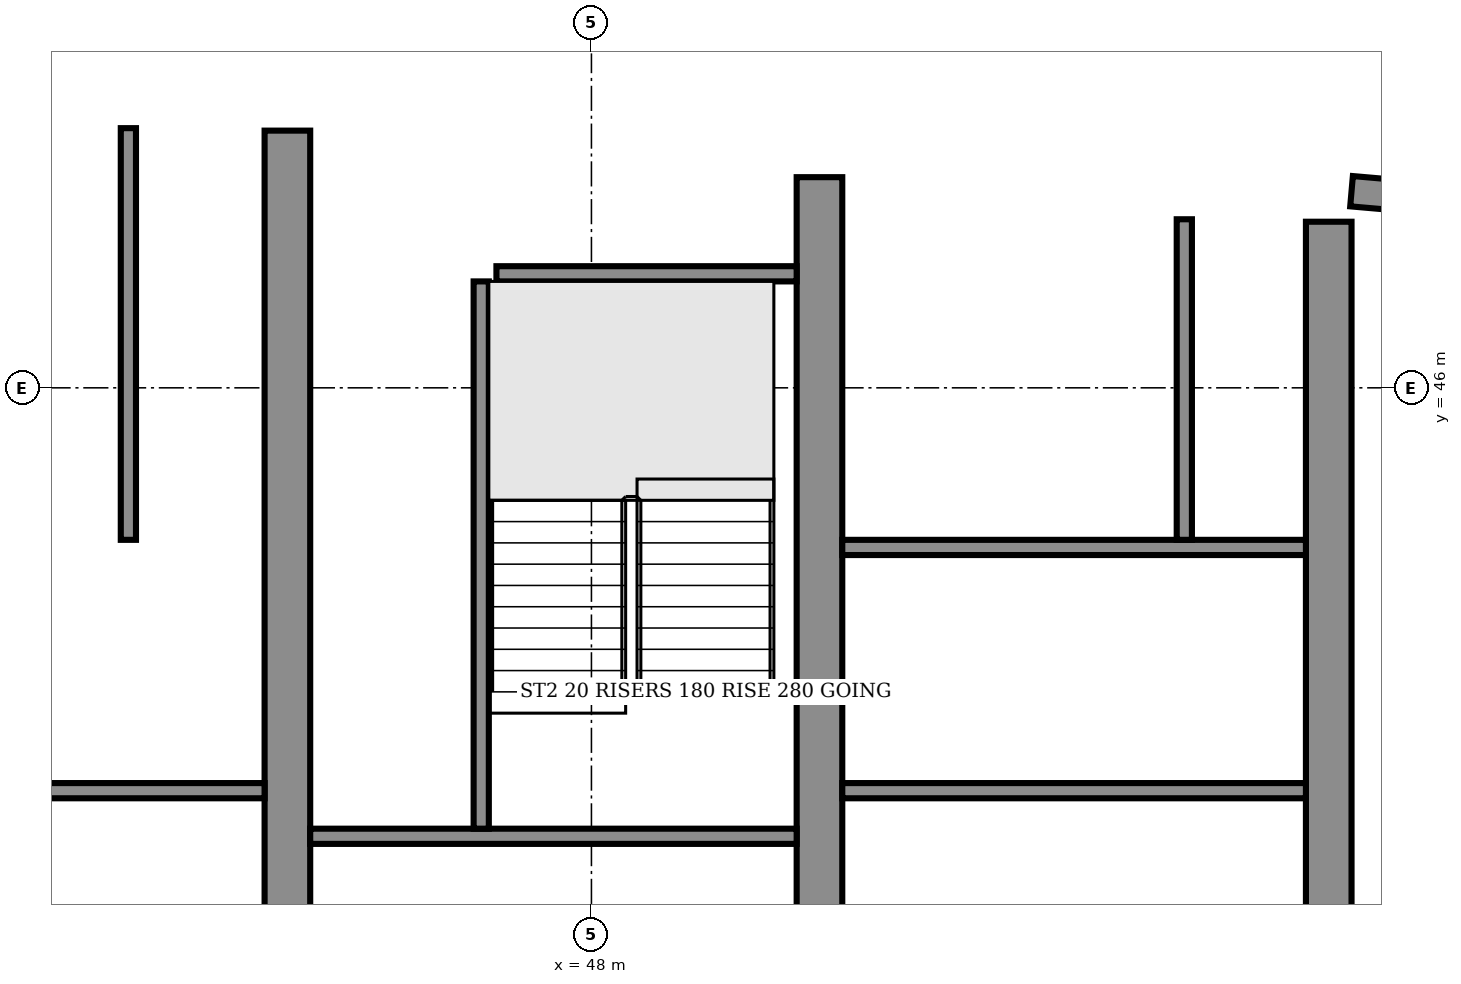
"""IFC4 building model, lengths in metres.
Left out: names, types, materials, properties, quantities, classifications, styles, units other than length and angle.
Written with IfcOpenShell. Run it as: python <this file> out.ifc"""

import sys

from ifc_helpers import new_model, si_unit, direction, frame, frame_2d, origin, origin_2d, place, context, subcontext, project, spatial, polyline, rectangle, i_section, outline, extrude, element, fill, save


model = new_model("IFC4")
c1 = context("Model", 3, precision=1e-05, world=origin(), true_north=direction((0.0, 1.0)))
c2 = subcontext(c1, "Body", "Model", "MODEL_VIEW")
j1 = project(units=[si_unit("LENGTHUNIT", "METRE"), si_unit("PLANEANGLEUNIT", "RADIAN")], contexts=[c1])
p1 = place(None, origin())
s1 = spatial("IfcSite", under=j1, at=p1, CompositionType="ELEMENT")
p2 = place(p1, origin())
s2 = spatial("IfcBuilding", under=s1, at=p2, CompositionType="ELEMENT")
p3 = place(p2, frame((0.0, 0.0, 207.1)))
s3 = spatial("IfcBuildingStorey", under=s2, at=p3, CompositionType="ELEMENT", Elevation=207.1)
p4 = place(p3, frame((0.0, 0.0, -0.0)))
e1 = element("IfcWall", 1, at=p4, inside=s3, PredefinedType="SHEAR", context=c2, shape_type="SweptSolid", body=[
    extrude(outline(polyline([(23.0, 48.185), (40.5, 49.716), (58.0, 48.185), (58.0, 48.787), (40.5, 50.318), (23.0, 48.787), (23.0, 48.185)])), origin(), (0.0, 0.0, 1.0), 3.6),
])
p5 = place(p3, frame((44.0, 34.6, 0.0), z_axis=(0.0, 0.0, 1.0), x_axis=(0.0, 1.0, 0.0)))
e2 = element("IfcWall", 2, at=p5, inside=s3, PredefinedType="SHEAR", context=c2, shape_type="SweptSolid", body=[
    extrude(rectangle(XDim=14.784, YDim=0.6, at=frame_2d((7.392, 0.0))), origin(), (0.0, 0.0, 1.0), 3.6),
])
p6 = place(p5, frame((11.608, 0.0, 0.0)))
e3 = element("IfcOpeningElement", 3, at=p6, cuts=e2, PredefinedType="OPENING", context=c2, shape_type="SweptSolid", body=[
    extrude(rectangle(XDim=1.0, YDim=2.1, at=frame_2d((0.5, 1.05))), frame((0.0, 0.31, 0.0), z_axis=(0.0, -1.0, 0.0), x_axis=(1.0, 0.0, 0.0)), (0.0, 0.0, 1.0), 0.62),
])
p7 = place(p5, frame((3.8, 0.0, 0.0)))
e4 = element("IfcOpeningElement", 4, at=p7, cuts=e2, PredefinedType="OPENING", context=c2, shape_type="SweptSolid", body=[
    extrude(rectangle(XDim=1.1, YDim=2.1, at=frame_2d((0.55, 1.05))), frame((0.0, 0.31, 0.0), z_axis=(0.0, -1.0, 0.0), x_axis=(1.0, 0.0, 0.0)), (0.0, 0.0, 1.0), 0.62),
])
p8 = place(p3, frame((51.0, 34.6, 0.0), z_axis=(0.0, 0.0, 1.0), x_axis=(0.0, 1.0, 0.0)))
e5 = element("IfcWall", 5, at=p8, inside=s3, PredefinedType="SHEAR", context=c2, shape_type="SweptSolid", body=[
    extrude(rectangle(XDim=14.171, YDim=0.6, at=frame_2d((7.085, 0.0))), origin(), (0.0, 0.0, 1.0), 3.6),
])
p9 = place(p8, frame((3.8, 0.0, 0.0)))
e6 = element("IfcOpeningElement", 6, at=p9, cuts=e5, PredefinedType="OPENING", context=c2, shape_type="SweptSolid", body=[
    extrude(rectangle(XDim=1.1, YDim=2.1, at=frame_2d((0.55, 1.05))), frame((0.0, 0.31, 0.0), z_axis=(0.0, -1.0, 0.0), x_axis=(1.0, 0.0, 0.0)), (0.0, 0.0, 1.0), 0.62),
])
p10 = place(p3, frame((57.7, 34.6, 0.0), z_axis=(0.0, 0.0, 1.0), x_axis=(0.0, 1.0, 0.0)))
e7 = element("IfcWall", 7, at=p10, inside=s3, PredefinedType="SHEAR", context=c2, shape_type="SweptSolid", body=[
    extrude(rectangle(XDim=13.585, YDim=0.6, at=frame_2d((6.792, 0.0))), origin(), (0.0, 0.0, 1.0), 3.6),
])
p11 = place(p3, frame((48.0, 50.022, 0.0), z_axis=(0.0, 0.0, 1.0), x_axis=(0.087156, 0.996197, 0.0)))
e8 = element("IfcColumn", 8, at=p11, inside=s3, PredefinedType="COLUMN", context=c2, shape_type="SweptSolid", body=[
    extrude(i_section(OverallWidth=0.3, OverallDepth=0.5, WebThickness=0.014, FlangeThickness=0.028, FilletRadius=0.027, at=origin_2d()), origin(), (0.0, 0.0, 1.0), 3.6),
])
p12 = place(p3, frame((60.983, 48.326, 0.0), z_axis=(0.0, 0.0, 1.0), x_axis=(-0.996194, 0.087168, 0.0)))
e9 = element("IfcWall", 9, at=p12, inside=s3, PredefinedType="SOLIDWALL", context=c2, shape_type="SweptSolid", body=[
    extrude(rectangle(XDim=2.994, YDim=0.4, at=frame_2d((1.497, 0.0))), origin(), (0.0, 0.0, 1.0), 3.2),
])
p13 = place(p3, frame((37.3, 40.7, 0.0), z_axis=(0.0, 0.0, 1.0), x_axis=(1.0, 0.0, 0.0)))
e10 = element("IfcWall", 10, at=p13, inside=s3, PredefinedType="PARTITIONING", context=c2, shape_type="SweptSolid", body=[
    extrude(rectangle(XDim=6.4, YDim=0.2, at=frame_2d((3.2, 0.0))), origin(), (0.0, 0.0, 1.0), 3.2),
])
p14 = place(p13, frame((0.417, 0.0, 0.0)))
e11 = element("IfcOpeningElement", 11, at=p14, cuts=e10, PredefinedType="OPENING", context=c2, shape_type="SweptSolid", body=[
    extrude(rectangle(XDim=1.1, YDim=2.1, at=frame_2d((0.55, 1.05))), frame((0.0, 0.11, 0.0), z_axis=(0.0, -1.0, 0.0), x_axis=(1.0, 0.0, 0.0)), (0.0, 0.0, 1.0), 0.22),
])
p15 = place(p13, frame((2.65, 0.0, 0.0)))
e12 = element("IfcOpeningElement", 12, at=p15, cuts=e10, PredefinedType="OPENING", context=c2, shape_type="SweptSolid", body=[
    extrude(rectangle(XDim=1.1, YDim=2.1, at=frame_2d((0.55, 1.05))), frame((0.0, 0.11, 0.0), z_axis=(0.0, -1.0, 0.0), x_axis=(1.0, 0.0, 0.0)), (0.0, 0.0, 1.0), 0.22),
])
p16 = place(p13, frame((4.883, 0.0, 0.0)))
e13 = element("IfcOpeningElement", 13, at=p16, cuts=e10, PredefinedType="OPENING", context=c2, shape_type="SweptSolid", body=[
    extrude(rectangle(XDim=1.1, YDim=2.1, at=frame_2d((0.55, 1.05))), frame((0.0, 0.11, 0.0), z_axis=(0.0, -1.0, 0.0), x_axis=(1.0, 0.0, 0.0)), (0.0, 0.0, 1.0), 0.22),
])
p17 = place(p3, frame((0.0, 0.0, -0.0)))
e14 = element("IfcWall", 14, at=p17, inside=s3, PredefinedType="PARTITIONING", context=c2, shape_type="SweptSolid", body=[
    extrude(outline(polyline([(39.433, 40.8), (39.233, 40.8), (39.233, 43.8), (37.3, 43.8), (37.3, 44.0), (43.7, 44.0), (43.7, 43.8), (41.767, 43.8), (41.767, 40.8), (41.567, 40.8), (41.567, 43.8), (39.433, 43.8), (39.433, 40.8)])), origin(), (0.0, 0.0, 1.0), 3.2),
])
p18 = place(p3, frame((41.908, 44.0, 0.0), z_axis=(0.0, 0.0, 1.0), x_axis=(0.0, 1.0, 0.0)))
e15 = element("IfcWall", 15, at=p18, inside=s3, PredefinedType="PARTITIONING", context=c2, shape_type="SweptSolid", body=[
    extrude(rectangle(XDim=5.416, YDim=0.2, at=frame_2d((2.708, 0.0))), origin(), (0.0, 0.0, 1.0), 3.2),
])
p19 = place(p18, frame((2.208, 0.0, 0.0)))
e16 = element("IfcOpeningElement", 16, at=p19, cuts=e15, PredefinedType="OPENING", context=c2, shape_type="SweptSolid", body=[
    extrude(rectangle(XDim=1.0, YDim=2.1, at=frame_2d((0.5, 1.05))), frame((0.0, 0.11, 0.0), z_axis=(0.0, -1.0, 0.0), x_axis=(1.0, 0.0, 0.0)), (0.0, 0.0, 1.0), 0.22),
])
p20 = place(p3, frame((44.3, 40.1, 0.0), z_axis=(0.0, 0.0, 1.0), x_axis=(1.0, 0.0, 0.0)))
e17 = element("IfcWall", 17, at=p20, inside=s3, PredefinedType="SHEAR", context=c2, shape_type="SweptSolid", body=[
    extrude(rectangle(XDim=6.4, YDim=0.2, at=frame_2d((3.2, 0.0))), origin(), (0.0, 0.0, 1.0), 3.2),
])
p21 = place(p20, frame((3.625, 0.0, 0.0)))
e18 = element("IfcOpeningElement", 18, at=p21, cuts=e17, PredefinedType="OPENING", context=c2, shape_type="SweptSolid", body=[
    extrude(rectangle(XDim=1.2, YDim=2.1, at=frame_2d((0.6, 1.05))), frame((0.0, 0.11, 0.0), z_axis=(0.0, -1.0, 0.0), x_axis=(1.0, 0.0, 0.0)), (0.0, 0.0, 1.0), 0.22),
])
p22 = place(p20, frame((0.625, 0.0, 0.0)))
e19 = element("IfcOpeningElement", 19, at=p22, cuts=e17, PredefinedType="OPENING", context=c2, shape_type="SweptSolid", body=[
    extrude(rectangle(XDim=0.9, YDim=2.1, at=frame_2d((0.45, 1.05))), frame((0.0, 0.11, 0.0), z_axis=(0.0, -1.0, 0.0), x_axis=(1.0, 0.0, 0.0)), (0.0, 0.0, 1.0), 0.22),
])
p23 = place(p3, frame((46.55, 40.2, 0.0), z_axis=(0.0, 0.0, 1.0), x_axis=(0.0, 1.0, 0.0)))
e20 = element("IfcWall", 20, at=p23, inside=s3, PredefinedType="SHEAR", context=c2, shape_type="SweptSolid", body=[
    extrude(rectangle(XDim=7.2, YDim=0.2, at=frame_2d((3.6, 0.0))), origin(), (0.0, 0.0, 1.0), 3.2),
])
p24 = place(p3, frame((46.75, 47.5, 0.0), z_axis=(0.0, 0.0, 1.0), x_axis=(1.0, 0.0, 0.0)))
e21 = element("IfcWall", 21, at=p24, inside=s3, PredefinedType="SHEAR", context=c2, shape_type="SweptSolid", body=[
    extrude(rectangle(XDim=3.95, YDim=0.2, at=frame_2d((1.975, 0.0))), origin(), (0.0, 0.0, 1.0), 3.2),
])
p25 = place(p3, frame((51.3, 40.7, 0.0), z_axis=(0.0, 0.0, 1.0), x_axis=(1.0, 0.0, 0.0)))
e22 = element("IfcWall", 22, at=p25, inside=s3, PredefinedType="PARTITIONING", context=c2, shape_type="SweptSolid", body=[
    extrude(rectangle(XDim=6.1, YDim=0.2, at=frame_2d((3.05, 0.0))), origin(), (0.0, 0.0, 1.0), 3.2),
])
p26 = place(p25, frame((0.417, 0.0, 0.0)))
e23 = element("IfcOpeningElement", 23, at=p26, cuts=e22, PredefinedType="OPENING", context=c2, shape_type="SweptSolid", body=[
    extrude(rectangle(XDim=1.1, YDim=2.1, at=frame_2d((0.55, 1.05))), frame((0.0, 0.11, 0.0), z_axis=(0.0, -1.0, 0.0), x_axis=(1.0, 0.0, 0.0)), (0.0, 0.0, 1.0), 0.22),
])
p27 = place(p25, frame((3.617, 0.0, 0.0)))
e24 = element("IfcOpeningElement", 24, at=p27, cuts=e22, PredefinedType="OPENING", context=c2, shape_type="SweptSolid", body=[
    extrude(rectangle(XDim=1.0, YDim=2.1, at=frame_2d((0.5, 1.05))), frame((0.0, 0.11, 0.0), z_axis=(0.0, -1.0, 0.0), x_axis=(1.0, 0.0, 0.0)), (0.0, 0.0, 1.0), 0.22),
])
p28 = place(p3, frame((51.3, 43.9, 0.0), z_axis=(0.0, 0.0, 1.0), x_axis=(1.0, 0.0, 0.0)))
e25 = element("IfcWall", 25, at=p28, inside=s3, PredefinedType="PARTITIONING", context=c2, shape_type="SweptSolid", body=[
    extrude(rectangle(XDim=6.1, YDim=0.2, at=frame_2d((3.05, 0.0))), origin(), (0.0, 0.0, 1.0), 3.2),
])
p29 = place(p28, frame((2.817, 0.0, 0.0)))
e26 = element("IfcOpeningElement", 26, at=p29, cuts=e25, PredefinedType="OPENING", context=c2, shape_type="SweptSolid", body=[
    extrude(rectangle(XDim=1.0, YDim=2.1, at=frame_2d((0.5, 1.05))), frame((0.0, 0.11, 0.0), z_axis=(0.0, -1.0, 0.0), x_axis=(1.0, 0.0, 0.0)), (0.0, 0.0, 1.0), 0.22),
])
p30 = place(p28, frame((4.8, 0.0, 0.0)))
e27 = element("IfcOpeningElement", 27, at=p30, cuts=e25, PredefinedType="OPENING", context=c2, shape_type="SweptSolid", body=[
    extrude(rectangle(XDim=1.0, YDim=2.1, at=frame_2d((0.5, 1.05))), frame((0.0, 0.11, 0.0), z_axis=(0.0, -1.0, 0.0), x_axis=(1.0, 0.0, 0.0)), (0.0, 0.0, 1.0), 0.22),
])
p31 = place(p3, frame((0.0, 0.0, -0.0)))
e28 = element("IfcWall", 28, at=p31, inside=s3, PredefinedType="PARTITIONING", context=c2, shape_type="SweptSolid", body=[
    extrude(outline(polyline([(53.433, 40.8), (53.433, 43.8), (53.233, 43.8), (53.233, 40.8), (53.433, 40.8)])), origin(), (0.0, 0.0, 1.0), 3.2),
])
p32 = place(p3, frame((55.8, 44.0, 0.0), z_axis=(0.0, 0.0, 1.0), x_axis=(0.0, 1.0, 0.0)))
e29 = element("IfcWall", 29, at=p32, inside=s3, PredefinedType="PARTITIONING", context=c2, shape_type="SweptSolid", body=[
    extrude(rectangle(XDim=4.218, YDim=0.2, at=frame_2d((2.109, 0.0))), origin(), (0.0, 0.0, 1.0), 3.2),
])
p33 = place(p15, origin())
e30 = element("IfcDoor", 30, at=p33, inside=s3, OperationType="DOUBLE_DOOR_SLIDING", PredefinedType="DOOR", context=c2, shape_type="SweptSolid", body=[
    extrude(rectangle(XDim=1.1, YDim=2.1, at=frame_2d((0.55, 1.05))), frame((0.0, 0.025, 0.0), z_axis=(0.0, -1.0, 0.0), x_axis=(1.0, 0.0, 0.0)), (0.0, 0.0, 1.0), 0.05),
])
fill(e12, e30)
p34 = place(p16, origin())
e31 = element("IfcDoor", 31, at=p34, inside=s3, OperationType="DOUBLE_DOOR_SLIDING", PredefinedType="DOOR", context=c2, shape_type="SweptSolid", body=[
    extrude(rectangle(XDim=1.1, YDim=2.1, at=frame_2d((0.55, 1.05))), frame((0.0, 0.025, 0.0), z_axis=(0.0, -1.0, 0.0), x_axis=(1.0, 0.0, 0.0)), (0.0, 0.0, 1.0), 0.05),
])
fill(e13, e31)
p35 = place(p19, origin())
e32 = element("IfcDoor", 32, at=p35, inside=s3, OperationType="SINGLE_SWING_LEFT", PredefinedType="DOOR", context=c2, shape_type="SweptSolid", body=[
    extrude(rectangle(XDim=1.0, YDim=2.1, at=frame_2d((0.5, 1.05))), frame((0.0, 0.025, 0.0), z_axis=(0.0, -1.0, 0.0), x_axis=(1.0, 0.0, 0.0)), (0.0, 0.0, 1.0), 0.05),
])
fill(e16, e32)
p36 = place(p6, origin())
e33 = element("IfcDoor", 33, at=p36, inside=s3, OperationType="SINGLE_SWING_LEFT", PredefinedType="DOOR", context=c2, shape_type="SweptSolid", body=[
    extrude(rectangle(XDim=1.0, YDim=2.1, at=frame_2d((0.5, 1.05))), frame((0.0, 0.025, 0.0), z_axis=(0.0, -1.0, 0.0), x_axis=(1.0, 0.0, 0.0)), (0.0, 0.0, 1.0), 0.05),
])
fill(e3, e33)
p37 = place(p21, origin())
e34 = element("IfcDoor", 34, at=p37, inside=s3, OperationType="SINGLE_SWING_RIGHT", PredefinedType="DOOR", context=c2, shape_type="SweptSolid", body=[
    extrude(rectangle(XDim=1.2, YDim=2.1, at=frame_2d((0.6, 1.05))), frame((0.0, 0.025, 0.0), z_axis=(0.0, -1.0, 0.0), x_axis=(1.0, 0.0, 0.0)), (0.0, 0.0, 1.0), 0.05),
])
fill(e18, e34)
p38 = place(p22, origin())
e35 = element("IfcDoor", 35, at=p38, inside=s3, OperationType="SINGLE_SWING_LEFT", PredefinedType="DOOR", context=c2, shape_type="SweptSolid", body=[
    extrude(rectangle(XDim=0.9, YDim=2.1, at=frame_2d((0.45, 1.05))), frame((0.0, 0.025, 0.0), z_axis=(0.0, -1.0, 0.0), x_axis=(1.0, 0.0, 0.0)), (0.0, 0.0, 1.0), 0.05),
])
fill(e19, e35)
p39 = place(p26, origin())
e36 = element("IfcDoor", 36, at=p39, inside=s3, OperationType="DOUBLE_DOOR_SLIDING", PredefinedType="DOOR", context=c2, shape_type="SweptSolid", body=[
    extrude(rectangle(XDim=1.1, YDim=2.1, at=frame_2d((0.55, 1.05))), frame((0.0, 0.025, 0.0), z_axis=(0.0, -1.0, 0.0), x_axis=(1.0, 0.0, 0.0)), (0.0, 0.0, 1.0), 0.05),
])
fill(e23, e36)
p40 = place(p27, origin())
e37 = element("IfcDoor", 37, at=p40, inside=s3, OperationType="SINGLE_SWING_RIGHT", PredefinedType="DOOR", context=c2, shape_type="SweptSolid", body=[
    extrude(rectangle(XDim=1.0, YDim=2.1, at=frame_2d((0.5, 1.05))), frame((0.0, 0.025, 0.0), z_axis=(0.0, -1.0, 0.0), x_axis=(1.0, 0.0, 0.0)), (0.0, 0.0, 1.0), 0.05),
])
fill(e24, e37)
p41 = place(p29, origin())
e38 = element("IfcDoor", 38, at=p41, inside=s3, OperationType="SINGLE_SWING_LEFT", PredefinedType="DOOR", context=c2, shape_type="SweptSolid", body=[
    extrude(rectangle(XDim=1.0, YDim=2.1, at=frame_2d((0.5, 1.05))), frame((0.0, 0.025, 0.0), z_axis=(0.0, -1.0, 0.0), x_axis=(1.0, 0.0, 0.0)), (0.0, 0.0, 1.0), 0.05),
])
fill(e26, e38)
p42 = place(p30, origin())
e39 = element("IfcDoor", 39, at=p42, inside=s3, OperationType="SINGLE_SWING_LEFT", PredefinedType="DOOR", context=c2, shape_type="SweptSolid", body=[
    extrude(rectangle(XDim=1.0, YDim=2.1, at=frame_2d((0.5, 1.05))), frame((0.0, 0.025, 0.0), z_axis=(0.0, -1.0, 0.0), x_axis=(1.0, 0.0, 0.0)), (0.0, 0.0, 1.0), 0.05),
])
fill(e27, e39)
p43 = place(p7, origin())
e40 = element("IfcDoor", 40, at=p43, inside=s3, OperationType="SINGLE_SWING_LEFT", PredefinedType="DOOR", context=c2, shape_type="SweptSolid", body=[
    extrude(rectangle(XDim=1.1, YDim=2.1, at=frame_2d((0.55, 1.05))), frame((0.0, 0.025, 0.0), z_axis=(0.0, -1.0, 0.0), x_axis=(1.0, 0.0, 0.0)), (0.0, 0.0, 1.0), 0.05),
])
fill(e4, e40)
p44 = place(p9, origin())
e41 = element("IfcDoor", 41, at=p44, inside=s3, OperationType="SINGLE_SWING_RIGHT", PredefinedType="DOOR", context=c2, shape_type="SweptSolid", body=[
    extrude(rectangle(XDim=1.1, YDim=2.1, at=frame_2d((0.55, 1.05))), frame((0.0, 0.025, 0.0), z_axis=(0.0, -1.0, 0.0), x_axis=(1.0, 0.0, 0.0)), (0.0, 0.0, 1.0), 0.05),
])
fill(e6, e41)
save(model, sys.argv[1])
